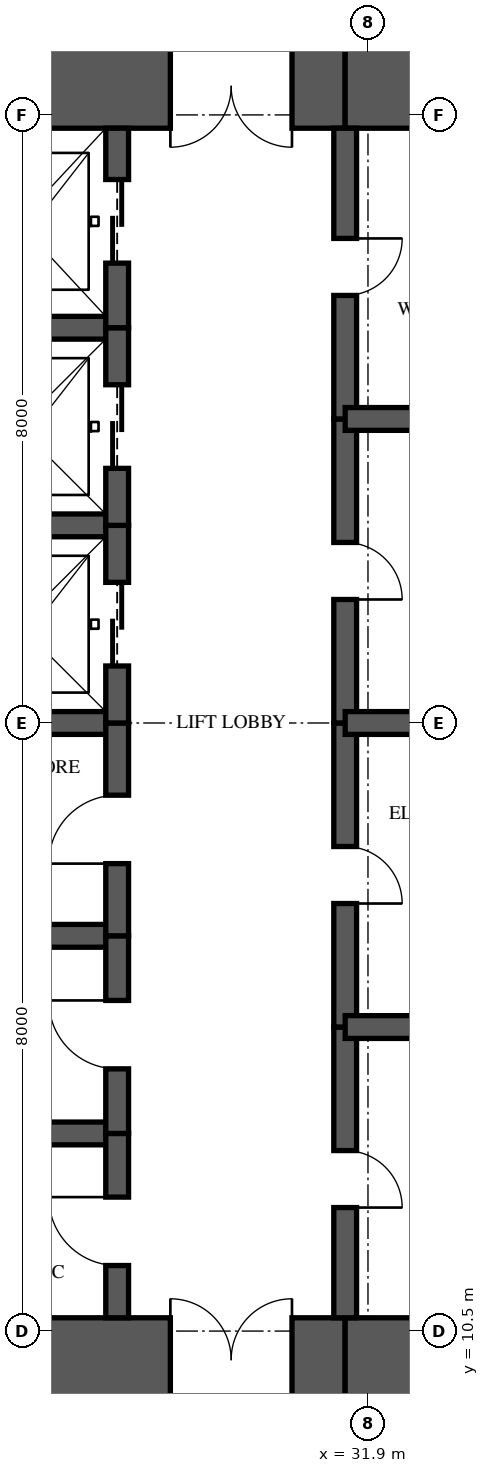
"""IFC4 building model, lengths in metres.
Left out: names, types, materials, properties, quantities, classifications, styles, units other than length and angle.
Written with IfcOpenShell. Run it as: python <this file> out.ifc"""

import sys

from ifc_helpers import new_model, si_unit, direction, frame, frame_2d, origin, place, context, subcontext, project, spatial, rectangle, extrude, element, fill, save


model = new_model("IFC4")
c1 = context("Model", 3, precision=1e-05, world=origin(), true_north=direction((0.0, 1.0)))
c2 = subcontext(c1, "Body", "Model", "MODEL_VIEW")
j1 = project(units=[si_unit("LENGTHUNIT", "METRE"), si_unit("PLANEANGLEUNIT", "RADIAN")], contexts=[c1])
p1 = place(None, origin())
s1 = spatial("IfcSite", under=j1, at=p1, CompositionType="ELEMENT")
p2 = place(p1, origin())
s2 = spatial("IfcBuilding", under=s1, at=p2, CompositionType="ELEMENT")
p3 = place(p2, frame((0.0, 0.0, 259.95)))
s3 = spatial("IfcBuildingStorey", under=s2, at=p3, CompositionType="ELEMENT", Elevation=259.95)
p4 = place(p3, frame((26.0, 10.125, 0.0), z_axis=(0.0, 0.0, 1.0), x_axis=(1.0, 0.0, 0.0)))
e1 = element("IfcWall", 1, at=p4, inside=s3, PredefinedType="SHEAR", context=c2, shape_type="SweptSolid", body=[
    extrude(rectangle(XDim=5.6, YDim=1.1, at=frame_2d((2.8, 0.0))), origin(), (0.0, 0.0, 1.0), 3.9),
])
p5 = place(p4, frame((3.3, 0.0, 0.0)))
e2 = element("IfcOpeningElement", 2, at=p5, cuts=e1, PredefinedType="OPENING", context=c2, shape_type="SweptSolid", body=[
    extrude(rectangle(XDim=1.6, YDim=2.1, at=frame_2d((0.8, 1.05))), frame((0.0, 0.56, 0.0), z_axis=(0.0, -1.0, 0.0), x_axis=(1.0, 0.0, 0.0)), (0.0, 0.0, 1.0), 1.12),
])
for number, where, z_axis, x_axis in (
    (3, (31.6, 10.125, 0.0), (0.0, 0.0, 1.0), (1.0, 0.0, 0.0)),
    (4, (35.9, 26.875, 0.0), (0.0, 0.0, 1.0), (-1.0, 0.0, 0.0)),
):
    element("IfcWall", number, at=place(p3, frame(where, z_axis=z_axis, x_axis=x_axis)), inside=s3, PredefinedType="SHEAR", context=c2, shape_type="SweptSolid", body=[
        extrude(rectangle(XDim=4.3, YDim=1.1, at=frame_2d((2.15, 0.0))), origin(), (0.0, 0.0, 1.0), 3.9),
    ])
p6 = place(p3, frame((31.6, 26.875, 0.0), z_axis=(0.0, 0.0, 1.0), x_axis=(-1.0, 0.0, 0.0)))
e5 = element("IfcWall", 5, at=p6, inside=s3, PredefinedType="SHEAR", context=c2, shape_type="SweptSolid", body=[
    extrude(rectangle(XDim=5.6, YDim=1.1, at=frame_2d((2.8, 0.0))), origin(), (0.0, 0.0, 1.0), 3.9),
])
p7 = place(p6, frame((0.7, 0.0, 0.0)))
e6 = element("IfcOpeningElement", 6, at=p7, cuts=e5, PredefinedType="OPENING", context=c2, shape_type="SweptSolid", body=[
    extrude(rectangle(XDim=1.6, YDim=2.1, at=frame_2d((0.8, 1.05))), frame((0.0, 0.56, 0.0), z_axis=(0.0, -1.0, 0.0), x_axis=(1.0, 0.0, 0.0)), (0.0, 0.0, 1.0), 1.12),
])
p8 = place(p3, frame((28.6, 10.675, 0.0), z_axis=(0.0, 0.0, 1.0), x_axis=(0.0, 1.0, 0.0)))
e7 = element("IfcWall", 7, at=p8, inside=s3, PredefinedType="SHEAR", context=c2, shape_type="SweptSolid", body=[
    extrude(rectangle(XDim=2.425, YDim=0.3, at=frame_2d((1.212, 0.0))), origin(), (0.0, 0.0, 1.0), 3.9),
])
p9 = place(p8, frame((0.688, 0.0, 0.0)))
e8 = element("IfcOpeningElement", 8, at=p9, cuts=e7, PredefinedType="OPENING", context=c2, shape_type="SweptSolid", body=[
    extrude(rectangle(XDim=0.9, YDim=2.1, at=frame_2d((0.45, 1.05))), frame((0.0, 0.16, 0.0), z_axis=(0.0, -1.0, 0.0), x_axis=(1.0, 0.0, 0.0)), (0.0, 0.0, 1.0), 0.32),
])
p10 = place(p3, frame((28.6, 13.1, 0.0), z_axis=(0.0, 0.0, 1.0), x_axis=(0.0, 1.0, 0.0)))
e9 = element("IfcWall", 9, at=p10, inside=s3, PredefinedType="SHEAR", context=c2, shape_type="SweptSolid", body=[
    extrude(rectangle(XDim=2.6, YDim=0.3, at=frame_2d((1.3, 0.0))), origin(), (0.0, 0.0, 1.0), 3.9),
])
p11 = place(p10, frame((0.85, 0.0, 0.0)))
e10 = element("IfcOpeningElement", 10, at=p11, cuts=e9, PredefinedType="OPENING", context=c2, shape_type="SweptSolid", body=[
    extrude(rectangle(XDim=0.9, YDim=2.1, at=frame_2d((0.45, 1.05))), frame((0.0, 0.16, 0.0), z_axis=(0.0, -1.0, 0.0), x_axis=(1.0, 0.0, 0.0)), (0.0, 0.0, 1.0), 0.32),
])
p12 = place(p3, frame((28.6, 15.7, 0.0), z_axis=(0.0, 0.0, 1.0), x_axis=(0.0, 1.0, 0.0)))
e11 = element("IfcWall", 11, at=p12, inside=s3, PredefinedType="SHEAR", context=c2, shape_type="SweptSolid", body=[
    extrude(rectangle(XDim=2.8, YDim=0.3, at=frame_2d((1.4, 0.0))), origin(), (0.0, 0.0, 1.0), 3.9),
])
p13 = place(p12, frame((0.95, 0.0, 0.0)))
e12 = element("IfcOpeningElement", 12, at=p13, cuts=e11, PredefinedType="OPENING", context=c2, shape_type="SweptSolid", body=[
    extrude(rectangle(XDim=0.9, YDim=2.1, at=frame_2d((0.45, 1.05))), frame((0.0, 0.16, 0.0), z_axis=(0.0, -1.0, 0.0), x_axis=(1.0, 0.0, 0.0)), (0.0, 0.0, 1.0), 0.32),
])
p14 = place(p3, frame((28.6, 18.5, 0.0), z_axis=(0.0, 0.0, 1.0), x_axis=(0.0, 1.0, 0.0)))
e13 = element("IfcWall", 13, at=p14, inside=s3, PredefinedType="SHEAR", context=c2, shape_type="SweptSolid", body=[
    extrude(rectangle(XDim=2.6, YDim=0.3, at=frame_2d((1.3, 0.0))), origin(), (0.0, 0.0, 1.0), 3.9),
])
p15 = place(p14, frame((0.75, 0.0, 0.0)))
e14 = element("IfcOpeningElement", 14, at=p15, cuts=e13, PredefinedType="OPENING", context=c2, shape_type="SweptSolid", body=[
    extrude(rectangle(XDim=1.1, YDim=2.1, at=frame_2d((0.55, 1.05))), frame((0.0, 0.16, 0.0), z_axis=(0.0, -1.0, 0.0), x_axis=(1.0, 0.0, 0.0)), (0.0, 0.0, 1.0), 0.32),
])
p16 = place(p3, frame((28.6, 21.1, 0.0), z_axis=(0.0, 0.0, 1.0), x_axis=(0.0, 1.0, 0.0)))
e15 = element("IfcWall", 15, at=p16, inside=s3, PredefinedType="SHEAR", context=c2, shape_type="SweptSolid", body=[
    extrude(rectangle(XDim=2.6, YDim=0.3, at=frame_2d((1.3, 0.0))), origin(), (0.0, 0.0, 1.0), 3.9),
])
p17 = place(p16, frame((0.75, 0.0, 0.0)))
e16 = element("IfcOpeningElement", 16, at=p17, cuts=e15, PredefinedType="OPENING", context=c2, shape_type="SweptSolid", body=[
    extrude(rectangle(XDim=1.1, YDim=2.1, at=frame_2d((0.55, 1.05))), frame((0.0, 0.16, 0.0), z_axis=(0.0, -1.0, 0.0), x_axis=(1.0, 0.0, 0.0)), (0.0, 0.0, 1.0), 0.32),
])
p18 = place(p3, frame((28.6, 23.7, 0.0), z_axis=(0.0, 0.0, 1.0), x_axis=(0.0, 1.0, 0.0)))
e17 = element("IfcWall", 17, at=p18, inside=s3, PredefinedType="SHEAR", context=c2, shape_type="SweptSolid", body=[
    extrude(rectangle(XDim=2.625, YDim=0.3, at=frame_2d((1.312, 0.0))), origin(), (0.0, 0.0, 1.0), 3.9),
])
p19 = place(p18, frame((0.85, 0.0, 0.0)))
e18 = element("IfcOpeningElement", 18, at=p19, cuts=e17, PredefinedType="OPENING", context=c2, shape_type="SweptSolid", body=[
    extrude(rectangle(XDim=1.1, YDim=2.1, at=frame_2d((0.55, 1.05))), frame((0.0, 0.16, 0.0), z_axis=(0.0, -1.0, 0.0), x_axis=(1.0, 0.0, 0.0)), (0.0, 0.0, 1.0), 0.32),
])
p20 = place(p3, frame((31.6, 10.675, 0.0), z_axis=(0.0, 0.0, 1.0), x_axis=(0.0, 1.0, 0.0)))
e19 = element("IfcWall", 19, at=p20, inside=s3, PredefinedType="SHEAR", context=c2, shape_type="SweptSolid", body=[
    extrude(rectangle(XDim=3.825, YDim=0.3, at=frame_2d((1.913, 0.0))), origin(), (0.0, 0.0, 1.0), 3.9),
])
p21 = place(p20, frame((1.45, 0.0, 0.0)))
e20 = element("IfcOpeningElement", 20, at=p21, cuts=e19, PredefinedType="OPENING", context=c2, shape_type="SweptSolid", body=[
    extrude(rectangle(XDim=0.75, YDim=2.1, at=frame_2d((0.375, 1.05))), frame((0.0, 0.16, 0.0), z_axis=(0.0, -1.0, 0.0), x_axis=(1.0, 0.0, 0.0)), (0.0, 0.0, 1.0), 0.32),
])
p22 = place(p3, frame((31.6, 14.5, 0.0), z_axis=(0.0, 0.0, 1.0), x_axis=(0.0, 1.0, 0.0)))
e21 = element("IfcWall", 21, at=p22, inside=s3, PredefinedType="SHEAR", context=c2, shape_type="SweptSolid", body=[
    extrude(rectangle(XDim=4.0, YDim=0.3, at=frame_2d((2.0, 0.0))), origin(), (0.0, 0.0, 1.0), 3.9),
])
p23 = place(p22, frame((1.625, 0.0, 0.0)))
e22 = element("IfcOpeningElement", 22, at=p23, cuts=e21, PredefinedType="OPENING", context=c2, shape_type="SweptSolid", body=[
    extrude(rectangle(XDim=0.75, YDim=2.1, at=frame_2d((0.375, 1.05))), frame((0.0, 0.16, 0.0), z_axis=(0.0, -1.0, 0.0), x_axis=(1.0, 0.0, 0.0)), (0.0, 0.0, 1.0), 0.32),
])
p24 = place(p3, frame((31.6, 18.5, 0.0), z_axis=(0.0, 0.0, 1.0), x_axis=(0.0, 1.0, 0.0)))
e23 = element("IfcWall", 23, at=p24, inside=s3, PredefinedType="SHEAR", context=c2, shape_type="SweptSolid", body=[
    extrude(rectangle(XDim=4.0, YDim=0.3, at=frame_2d((2.0, 0.0))), origin(), (0.0, 0.0, 1.0), 3.9),
])
p25 = place(p24, frame((1.625, 0.0, 0.0)))
e24 = element("IfcOpeningElement", 24, at=p25, cuts=e23, PredefinedType="OPENING", context=c2, shape_type="SweptSolid", body=[
    extrude(rectangle(XDim=0.75, YDim=2.1, at=frame_2d((0.375, 1.05))), frame((0.0, 0.16, 0.0), z_axis=(0.0, -1.0, 0.0), x_axis=(1.0, 0.0, 0.0)), (0.0, 0.0, 1.0), 0.32),
])
p26 = place(p3, frame((31.6, 22.5, 0.0), z_axis=(0.0, 0.0, 1.0), x_axis=(0.0, 1.0, 0.0)))
e25 = element("IfcWall", 25, at=p26, inside=s3, PredefinedType="SHEAR", context=c2, shape_type="SweptSolid", body=[
    extrude(rectangle(XDim=3.825, YDim=0.3, at=frame_2d((1.913, 0.0))), origin(), (0.0, 0.0, 1.0), 3.9),
])
p27 = place(p26, frame((1.625, 0.0, 0.0)))
e26 = element("IfcOpeningElement", 26, at=p27, cuts=e25, PredefinedType="OPENING", context=c2, shape_type="SweptSolid", body=[
    extrude(rectangle(XDim=0.75, YDim=2.1, at=frame_2d((0.375, 1.05))), frame((0.0, 0.16, 0.0), z_axis=(0.0, -1.0, 0.0), x_axis=(1.0, 0.0, 0.0)), (0.0, 0.0, 1.0), 0.32),
])
for number, where, z_axis, x_axis in (
    (27, (26.0, 13.1, 0.0), (0.0, 0.0, 1.0), (1.0, 0.0, 0.0)),
    (28, (26.0, 15.7, 0.0), (0.0, 0.0, 1.0), (1.0, 0.0, 0.0)),
    (29, (26.0, 18.5, 0.0), (0.0, 0.0, 1.0), (1.0, 0.0, 0.0)),
    (30, (26.0, 21.1, 0.0), (0.0, 0.0, 1.0), (1.0, 0.0, 0.0)),
    (31, (26.0, 23.7, 0.0), (0.0, 0.0, 1.0), (1.0, 0.0, 0.0)),
):
    element("IfcWall", number, at=place(p3, frame(where, z_axis=z_axis, x_axis=x_axis)), inside=s3, PredefinedType="SHEAR", context=c2, shape_type="SweptSolid", body=[
        extrude(rectangle(XDim=2.6, YDim=0.3, at=frame_2d((1.3, 0.0))), origin(), (0.0, 0.0, 1.0), 3.9),
    ])
for number, where, z_axis, x_axis in (
    (32, (31.6, 14.5, 0.0), (0.0, 0.0, 1.0), (1.0, 0.0, 0.0)),
    (33, (31.6, 18.5, 0.0), (0.0, 0.0, 1.0), (1.0, 0.0, 0.0)),
    (34, (31.6, 22.5, 0.0), (0.0, 0.0, 1.0), (1.0, 0.0, 0.0)),
):
    element("IfcWall", number, at=place(p3, frame(where, z_axis=z_axis, x_axis=x_axis)), inside=s3, PredefinedType="SHEAR", context=c2, shape_type="SweptSolid", body=[
        extrude(rectangle(XDim=4.3, YDim=0.3, at=frame_2d((2.15, 0.0))), origin(), (0.0, 0.0, 1.0), 3.9),
    ])
p28 = place(p15, origin())
e35 = element("IfcDoor", 35, at=p28, inside=s3, OperationType="SLIDING_TO_LEFT", PredefinedType="DOOR", context=c2, shape_type="SweptSolid", body=[
    extrude(rectangle(XDim=1.1, YDim=2.1, at=frame_2d((0.55, 1.05))), frame((0.0, 0.025, 0.0), z_axis=(0.0, -1.0, 0.0), x_axis=(1.0, 0.0, 0.0)), (0.0, 0.0, 1.0), 0.05),
])
fill(e14, e35)
p29 = place(p17, origin())
e36 = element("IfcDoor", 36, at=p29, inside=s3, OperationType="SLIDING_TO_LEFT", PredefinedType="DOOR", context=c2, shape_type="SweptSolid", body=[
    extrude(rectangle(XDim=1.1, YDim=2.1, at=frame_2d((0.55, 1.05))), frame((0.0, 0.025, 0.0), z_axis=(0.0, -1.0, 0.0), x_axis=(1.0, 0.0, 0.0)), (0.0, 0.0, 1.0), 0.05),
])
fill(e16, e36)
p30 = place(p19, origin())
e37 = element("IfcDoor", 37, at=p30, inside=s3, OperationType="SLIDING_TO_LEFT", PredefinedType="DOOR", context=c2, shape_type="SweptSolid", body=[
    extrude(rectangle(XDim=1.1, YDim=2.1, at=frame_2d((0.55, 1.05))), frame((0.0, 0.025, 0.0), z_axis=(0.0, -1.0, 0.0), x_axis=(1.0, 0.0, 0.0)), (0.0, 0.0, 1.0), 0.05),
])
fill(e18, e37)
p31 = place(p9, origin())
e38 = element("IfcDoor", 38, at=p31, inside=s3, OperationType="SINGLE_SWING_RIGHT", PredefinedType="DOOR", context=c2, shape_type="SweptSolid", body=[
    extrude(rectangle(XDim=0.9, YDim=2.1, at=frame_2d((0.45, 1.05))), frame((0.0, 0.025, 0.0), z_axis=(0.0, -1.0, 0.0), x_axis=(1.0, 0.0, 0.0)), (0.0, 0.0, 1.0), 0.05),
])
fill(e8, e38)
p32 = place(p11, origin())
e39 = element("IfcDoor", 39, at=p32, inside=s3, OperationType="SINGLE_SWING_RIGHT", PredefinedType="DOOR", context=c2, shape_type="SweptSolid", body=[
    extrude(rectangle(XDim=0.9, YDim=2.1, at=frame_2d((0.45, 1.05))), frame((0.0, 0.025, 0.0), z_axis=(0.0, -1.0, 0.0), x_axis=(1.0, 0.0, 0.0)), (0.0, 0.0, 1.0), 0.05),
])
fill(e10, e39)
p33 = place(p13, origin())
e40 = element("IfcDoor", 40, at=p33, inside=s3, OperationType="SINGLE_SWING_LEFT", PredefinedType="DOOR", context=c2, shape_type="SweptSolid", body=[
    extrude(rectangle(XDim=0.9, YDim=2.1, at=frame_2d((0.45, 1.05))), frame((0.0, 0.025, 0.0), z_axis=(0.0, -1.0, 0.0), x_axis=(1.0, 0.0, 0.0)), (0.0, 0.0, 1.0), 0.05),
])
fill(e12, e40)
p34 = place(p5, origin())
e41 = element("IfcDoor", 41, at=p34, inside=s3, OperationType="DOUBLE_DOOR_SINGLE_SWING", PredefinedType="DOOR", context=c2, shape_type="SweptSolid", body=[
    extrude(rectangle(XDim=1.6, YDim=2.1, at=frame_2d((0.8, 1.05))), frame((0.0, 0.025, 0.0), z_axis=(0.0, -1.0, 0.0), x_axis=(1.0, 0.0, 0.0)), (0.0, 0.0, 1.0), 0.05),
])
fill(e2, e41)
p35 = place(p7, origin())
e42 = element("IfcDoor", 42, at=p35, inside=s3, OperationType="DOUBLE_DOOR_SINGLE_SWING", PredefinedType="DOOR", context=c2, shape_type="SweptSolid", body=[
    extrude(rectangle(XDim=1.6, YDim=2.1, at=frame_2d((0.8, 1.05))), frame((0.0, 0.025, 0.0), z_axis=(0.0, -1.0, 0.0), x_axis=(1.0, 0.0, 0.0)), (0.0, 0.0, 1.0), 0.05),
])
fill(e6, e42)
p36 = place(p21, frame((0.75, 0.0, 0.0), z_axis=(0.0, 0.0, 1.0), x_axis=(-1.0, 0.0, 0.0)))
e43 = element("IfcDoor", 43, at=p36, inside=s3, OperationType="SINGLE_SWING_RIGHT", PredefinedType="DOOR", context=c2, shape_type="SweptSolid", body=[
    extrude(rectangle(XDim=0.75, YDim=2.1, at=frame_2d((0.375, 1.05))), frame((0.0, 0.025, 0.0), z_axis=(0.0, -1.0, 0.0), x_axis=(1.0, 0.0, 0.0)), (0.0, 0.0, 1.0), 0.05),
])
fill(e20, e43)
p37 = place(p23, frame((0.75, 0.0, 0.0), z_axis=(0.0, 0.0, 1.0), x_axis=(-1.0, 0.0, 0.0)))
e44 = element("IfcDoor", 44, at=p37, inside=s3, OperationType="SINGLE_SWING_RIGHT", PredefinedType="DOOR", context=c2, shape_type="SweptSolid", body=[
    extrude(rectangle(XDim=0.75, YDim=2.1, at=frame_2d((0.375, 1.05))), frame((0.0, 0.025, 0.0), z_axis=(0.0, -1.0, 0.0), x_axis=(1.0, 0.0, 0.0)), (0.0, 0.0, 1.0), 0.05),
])
fill(e22, e44)
p38 = place(p25, frame((0.75, 0.0, 0.0), z_axis=(0.0, 0.0, 1.0), x_axis=(-1.0, 0.0, 0.0)))
e45 = element("IfcDoor", 45, at=p38, inside=s3, OperationType="SINGLE_SWING_RIGHT", PredefinedType="DOOR", context=c2, shape_type="SweptSolid", body=[
    extrude(rectangle(XDim=0.75, YDim=2.1, at=frame_2d((0.375, 1.05))), frame((0.0, 0.025, 0.0), z_axis=(0.0, -1.0, 0.0), x_axis=(1.0, 0.0, 0.0)), (0.0, 0.0, 1.0), 0.05),
])
fill(e24, e45)
p39 = place(p27, frame((0.75, 0.0, 0.0), z_axis=(0.0, 0.0, 1.0), x_axis=(-1.0, 0.0, 0.0)))
e46 = element("IfcDoor", 46, at=p39, inside=s3, OperationType="SINGLE_SWING_LEFT", PredefinedType="DOOR", context=c2, shape_type="SweptSolid", body=[
    extrude(rectangle(XDim=0.75, YDim=2.1, at=frame_2d((0.375, 1.05))), frame((0.0, 0.025, 0.0), z_axis=(0.0, -1.0, 0.0), x_axis=(1.0, 0.0, 0.0)), (0.0, 0.0, 1.0), 0.05),
])
fill(e26, e46)
save(model, sys.argv[1])
